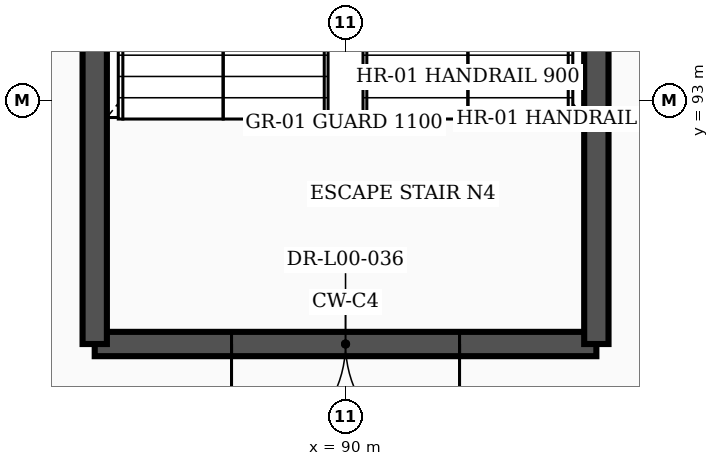
"""IFC4 building model, lengths in metres.
Left out: names, types, materials, properties, quantities, classifications, styles, units other than length and angle.
Written with IfcOpenShell. Run it as: python <this file> out.ifc"""

import sys

from ifc_helpers import new_model, si_unit, direction, frame, frame_2d, origin, place, context, subcontext, project, spatial, rectangle, extrude, element, fill, save


model = new_model("IFC4")
c1 = context("Model", 3, precision=1e-05, world=origin(), true_north=direction((0.0, 1.0)))
c2 = subcontext(c1, "Body", "Model", "MODEL_VIEW")
j1 = project(units=[si_unit("LENGTHUNIT", "METRE"), si_unit("PLANEANGLEUNIT", "RADIAN")], contexts=[c1])
p1 = place(None, origin())
s1 = spatial("IfcSite", under=j1, at=p1, CompositionType="ELEMENT")
p2 = place(p1, origin())
s2 = spatial("IfcBuilding", under=s1, at=p2, CompositionType="ELEMENT")
p3 = place(p2, origin())
s3 = spatial("IfcBuildingStorey", under=s2, at=p3, CompositionType="ELEMENT", Elevation=0.0)
p4 = place(p3, frame((86.7, 89.8, 0.0), z_axis=(0.0, 0.0, 1.0), x_axis=(1.0, 0.0, 0.0)))
e1 = element("IfcWall", 1, at=p4, inside=s3, PredefinedType="SHEAR", context=c2, shape_type="SweptSolid", body=[
    extrude(rectangle(XDim=6.6, YDim=0.32, at=frame_2d((3.3, 0.0))), origin(), (0.0, 0.0, 1.0), 5.75),
])
p5 = place(p4, frame((1.8, 0.0, 0.0)))
e2 = element("IfcOpeningElement", 2, at=p5, cuts=e1, PredefinedType="OPENING", context=c2, shape_type="SweptSolid", body=[
    extrude(rectangle(XDim=3.0, YDim=2.25, at=frame_2d((1.5, 1.125))), frame((0.0, 0.172, 0.0), z_axis=(0.0, -1.0, 0.0), x_axis=(1.0, 0.0, 0.0)), (0.0, 0.0, 1.0), 0.344),
])
for number, where, z_axis, x_axis in (
    (3, (86.7, 89.8, 0.0), (0.0, 0.0, 1.0), (0.0, 1.0, 0.0)),
    (4, (93.3, 89.8, 0.0), (0.0, 0.0, 1.0), (0.0, 1.0, 0.0)),
):
    element("IfcWall", number, at=place(p3, frame(where, z_axis=z_axis, x_axis=x_axis)), inside=s3, PredefinedType="SHEAR", context=c2, shape_type="SweptSolid", body=[
        extrude(rectangle(XDim=11.0, YDim=0.32, at=frame_2d((5.5, 0.0))), origin(), (0.0, 0.0, 1.0), 5.75),
    ])
p6 = place(p5, frame((3.0, 0.0, 0.0), z_axis=(0.0, 0.0, 1.0), x_axis=(-1.0, 0.0, 0.0)))
e5 = element("IfcDoor", 5, at=p6, inside=s3, OperationType="DOUBLE_DOOR_SINGLE_SWING", PredefinedType="DOOR", context=c2, shape_type="SweptSolid", body=[
    extrude(rectangle(XDim=3.0, YDim=2.25, at=frame_2d((1.5, 1.125))), frame((0.0, 0.025, 0.0), z_axis=(0.0, -1.0, 0.0), x_axis=(1.0, 0.0, 0.0)), (0.0, 0.0, 1.0), 0.05),
])
fill(e2, e5)
save(model, sys.argv[1])
